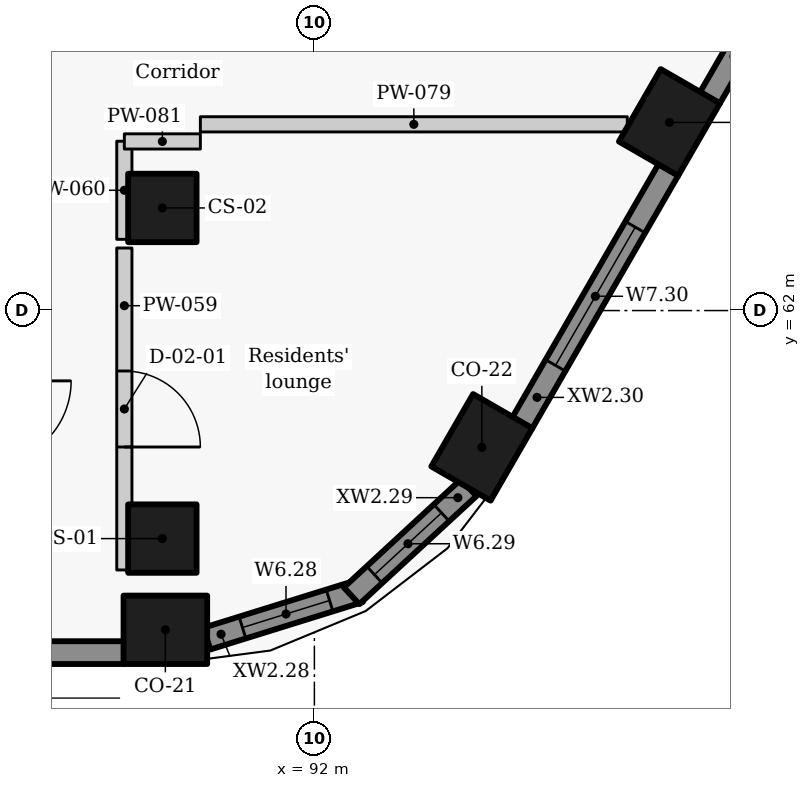
"""IFC4 building model, lengths in metres.
Left out: names, types, materials, properties, quantities, classifications, styles, units other than length and angle.
Written with IfcOpenShell. Run it as: python <this file> out.ifc"""

import sys

from ifc_helpers import new_model, si_unit, direction, frame, frame_2d, origin, origin_2d, place, context, subcontext, project, spatial, rectangle, extrude, element, fill, save


model = new_model("IFC4")
c1 = context("Model", 3, precision=1e-05, world=origin(), true_north=direction((0.0, 1.0)))
c2 = subcontext(c1, "Body", "Model", "MODEL_VIEW")
j1 = project(units=[si_unit("LENGTHUNIT", "METRE"), si_unit("PLANEANGLEUNIT", "RADIAN")], contexts=[c1])
p1 = place(None, origin())
s1 = spatial("IfcSite", under=j1, at=p1, CompositionType="ELEMENT")
p2 = place(p1, origin())
s2 = spatial("IfcBuilding", under=s1, at=p2, CompositionType="ELEMENT")
p3 = place(p2, frame((0.0, 0.0, 249.3)))
s3 = spatial("IfcBuildingStorey", under=s2, at=p3, CompositionType="ELEMENT", Elevation=249.3)
for number, where, z_axis, x_axis in (
    (1, (90.04, 57.8, 0.0), (0.0, 0.0, 1.0), (1.0, 0.0, 0.0)),
    (2, (94.203, 60.2, 0.0), (0.0, 0.0, 1.0), (0.5, 0.866, 0.0)),
    (3, (96.671, 64.475, 0.0), (0.0, 0.0, 1.0), (0.5, 0.866, 0.0)),
):
    element("IfcColumn", number, at=place(p3, frame(where, z_axis=z_axis, x_axis=x_axis)), inside=s3, PredefinedType="COLUMN", context=c2, shape_type="SweptSolid", body=[
        extrude(rectangle(XDim=1.1, YDim=0.9, at=origin_2d()), origin(), (0.0, 0.0, 1.0), 3.3),
    ])
for number, where, z_axis, x_axis in (
    (4, (90.0, 59.0, 0.0), (0.0, 0.0, 1.0), (0.0, 1.0, 0.0)),
    (5, (90.0, 63.35, 0.0), (0.0, 0.0, 1.0), (0.0, 1.0, 0.0)),
):
    element("IfcColumn", number, at=place(p3, frame(where, z_axis=z_axis, x_axis=x_axis)), inside=s3, PredefinedType="COLUMN", context=c2, shape_type="SweptSolid", body=[
        extrude(rectangle(XDim=0.9, YDim=0.9, at=origin_2d()), origin(), (0.0, 0.0, 1.0), 3.3),
    ])
p4 = place(p3, frame((70.501, 57.5, 0.0), z_axis=(0.0, 0.0, 1.0), x_axis=(1.0, 0.0, 0.0)))
e6 = element("IfcWall", 6, at=p4, inside=s3, PredefinedType="SOLIDWALL", context=c2, shape_type="SweptSolid", body=[
    extrude(rectangle(XDim=18.993, YDim=0.3, at=frame_2d((9.496, 0.0))), origin(), (0.0, 0.0, 1.0), 2.425),
])
p5 = place(p3, frame((90.586, 57.684, 0.0), z_axis=(0.0, 0.0, 1.0), x_axis=(0.954941641926, 0.296793632875, 0.0)))
e7 = element("IfcWall", 7, at=p5, inside=s3, PredefinedType="SOLIDWALL", context=c2, shape_type="SweptSolid", body=[
    extrude(rectangle(XDim=2.103, YDim=0.3, at=frame_2d((1.051, 0.0))), origin(), (0.0, 0.0, 1.0), 2.425),
])
p6 = place(p5, frame((0.49, 0.0, 0.9)))
e8 = element("IfcOpeningElement", 8, at=p6, cuts=e7, PredefinedType="OPENING", context=c2, shape_type="SweptSolid", body=[
    extrude(rectangle(XDim=1.2, YDim=1.1, at=frame_2d((0.6, 0.55))), frame((0.0, 0.16, 0.0), z_axis=(0.0, -1.0, 0.0), x_axis=(1.0, 0.0, 0.0)), (0.0, 0.0, 1.0), 0.32),
])
p7 = place(p3, frame((92.49, 58.247, 0.0), z_axis=(0.0, 0.0, 1.0), x_axis=(0.734830223907, 0.678251090698, 0.0)))
e9 = element("IfcWall", 9, at=p7, inside=s3, PredefinedType="SOLIDWALL", context=c2, shape_type="SweptSolid", body=[
    extrude(rectangle(XDim=2.097, YDim=0.3, at=frame_2d((1.049, 0.0))), origin(), (0.0, 0.0, 1.0), 2.425),
])
p8 = place(p7, frame((0.409, 0.0, 0.9)))
e10 = element("IfcOpeningElement", 10, at=p8, cuts=e9, PredefinedType="OPENING", context=c2, shape_type="SweptSolid", body=[
    extrude(rectangle(XDim=1.2, YDim=1.1, at=frame_2d((0.6, 0.55))), frame((0.0, 0.16, 0.0), z_axis=(0.0, -1.0, 0.0), x_axis=(1.0, 0.0, 0.0)), (0.0, 0.0, 1.0), 0.32),
])
p9 = place(p3, frame((94.736, 60.523, 0.0), z_axis=(0.0, 0.0, 1.0), x_axis=(0.499984490703, 0.866034357896, 0.0)))
e11 = element("IfcWall", 11, at=p9, inside=s3, PredefinedType="SOLIDWALL", context=c2, shape_type="SweptSolid", body=[
    extrude(rectangle(XDim=3.844, YDim=0.3, at=frame_2d((1.922, 0.0))), origin(), (0.0, 0.0, 1.0), 2.425),
])
p10 = place(p9, frame((0.872, 0.0, 0.9)))
e12 = element("IfcOpeningElement", 12, at=p10, cuts=e11, PredefinedType="OPENING", context=c2, shape_type="SweptSolid", body=[
    extrude(rectangle(XDim=2.1, YDim=1.1, at=frame_2d((1.05, 0.55))), frame((0.0, 0.16, 0.0), z_axis=(0.0, -1.0, 0.0), x_axis=(1.0, 0.0, 0.0)), (0.0, 0.0, 1.0), 0.32),
])
p11 = place(p3, frame((97.204, 64.798, 0.0), z_axis=(0.0, 0.0, 1.0), x_axis=(0.499984490703, 0.866034357896, 0.0)))
e13 = element("IfcWall", 13, at=p11, inside=s3, PredefinedType="SOLIDWALL", context=c2, shape_type="SweptSolid", body=[
    extrude(rectangle(XDim=3.844, YDim=0.3, at=frame_2d((1.922, 0.0))), origin(), (0.0, 0.0, 1.0), 2.425),
])
p12 = place(p11, frame((1.361, 0.0, 0.9)))
e14 = element("IfcOpeningElement", 14, at=p12, cuts=e13, PredefinedType="OPENING", context=c2, shape_type="SweptSolid", body=[
    extrude(rectangle(XDim=2.1, YDim=1.1, at=frame_2d((1.05, 0.55))), frame((0.0, 0.16, 0.0), z_axis=(0.0, -1.0, 0.0), x_axis=(1.0, 0.0, 0.0)), (0.0, 0.0, 1.0), 0.32),
])
p13 = place(p3, frame((89.5, 62.823, 0.0), z_axis=(0.0, 0.0, 1.0), x_axis=(0.0, -1.0, 0.0)))
e15 = element("IfcWall", 15, at=p13, inside=s3, PredefinedType="PARTITIONING", context=c2, shape_type="SweptSolid", body=[
    extrude(rectangle(XDim=4.236, YDim=0.2, at=frame_2d((2.118, 0.0))), origin(), (0.0, 0.0, 1.0), 3.025),
])
p14 = place(p13, frame((1.618, 0.0, 0.0)))
e16 = element("IfcOpeningElement", 16, at=p14, cuts=e15, PredefinedType="OPENING", context=c2, shape_type="SweptSolid", body=[
    extrude(rectangle(XDim=1.0, YDim=2.1, at=frame_2d((0.5, 1.05))), frame((0.0, 0.11, 0.0), z_axis=(0.0, -1.0, 0.0), x_axis=(1.0, 0.0, 0.0)), (0.0, 0.0, 1.0), 0.22),
])
p15 = place(p3, frame((89.5, 62.937, 0.0), z_axis=(0.0, 0.0, 1.0), x_axis=(0.0, 1.0, 0.0)))
e17 = element("IfcWall", 17, at=p15, inside=s3, PredefinedType="PARTITIONING", context=c2, shape_type="SweptSolid", body=[
    extrude(rectangle(XDim=1.291, YDim=0.2, at=frame_2d((0.646, 0.0))), origin(), (0.0, 0.0, 1.0), 3.025),
])
p16 = place(p3, frame((90.5, 64.45, 0.0), z_axis=(0.0, 0.0, 1.0), x_axis=(1.0, 0.0, 0.0)))
e18 = element("IfcWall", 18, at=p16, inside=s3, PredefinedType="PARTITIONING", context=c2, shape_type="SweptSolid", body=[
    extrude(rectangle(XDim=5.617, YDim=0.2, at=frame_2d((2.808, 0.0))), origin(), (0.0, 0.0, 1.0), 3.025),
])
p17 = place(p3, frame((89.5, 64.225, 0.0), z_axis=(0.0, 0.0, 1.0), x_axis=(1.0, 0.0, 0.0)))
e19 = element("IfcWall", 19, at=p17, inside=s3, PredefinedType="PARTITIONING", context=c2, shape_type="SweptSolid", body=[
    extrude(rectangle(XDim=1.0, YDim=0.2, at=frame_2d((0.5, 0.0))), origin(), (0.0, 0.0, 1.0), 2.505),
])
p18 = place(p6, origin())
e20 = element("IfcWindow", 20, at=p18, inside=s3, PartitioningType="SINGLE_PANEL", PredefinedType="WINDOW", context=c2, shape_type="SweptSolid", body=[
    extrude(rectangle(XDim=1.2, YDim=1.1, at=frame_2d((0.6, 0.55))), frame((0.0, 0.03, 0.0), z_axis=(0.0, -1.0, 0.0), x_axis=(1.0, 0.0, 0.0)), (0.0, 0.0, 1.0), 0.06),
])
fill(e8, e20)
p19 = place(p8, origin())
e21 = element("IfcWindow", 21, at=p19, inside=s3, PartitioningType="SINGLE_PANEL", PredefinedType="WINDOW", context=c2, shape_type="SweptSolid", body=[
    extrude(rectangle(XDim=1.2, YDim=1.1, at=frame_2d((0.6, 0.55))), frame((0.0, 0.03, 0.0), z_axis=(0.0, -1.0, 0.0), x_axis=(1.0, 0.0, 0.0)), (0.0, 0.0, 1.0), 0.06),
])
fill(e10, e21)
p20 = place(p10, origin())
e22 = element("IfcWindow", 22, at=p20, inside=s3, PartitioningType="SINGLE_PANEL", PredefinedType="WINDOW", context=c2, shape_type="SweptSolid", body=[
    extrude(rectangle(XDim=2.1, YDim=1.1, at=frame_2d((1.05, 0.55))), frame((0.0, 0.03, 0.0), z_axis=(0.0, -1.0, 0.0), x_axis=(1.0, 0.0, 0.0)), (0.0, 0.0, 1.0), 0.06),
])
fill(e12, e22)
p21 = place(p14, origin())
e23 = element("IfcDoor", 23, at=p21, inside=s3, OperationType="SINGLE_SWING_RIGHT", PredefinedType="DOOR", context=c2, shape_type="SweptSolid", body=[
    extrude(rectangle(XDim=1.0, YDim=2.1, at=frame_2d((0.5, 1.05))), frame((0.0, 0.025, 0.0), z_axis=(0.0, -1.0, 0.0), x_axis=(1.0, 0.0, 0.0)), (0.0, 0.0, 1.0), 0.05),
])
fill(e16, e23)
save(model, sys.argv[1])
